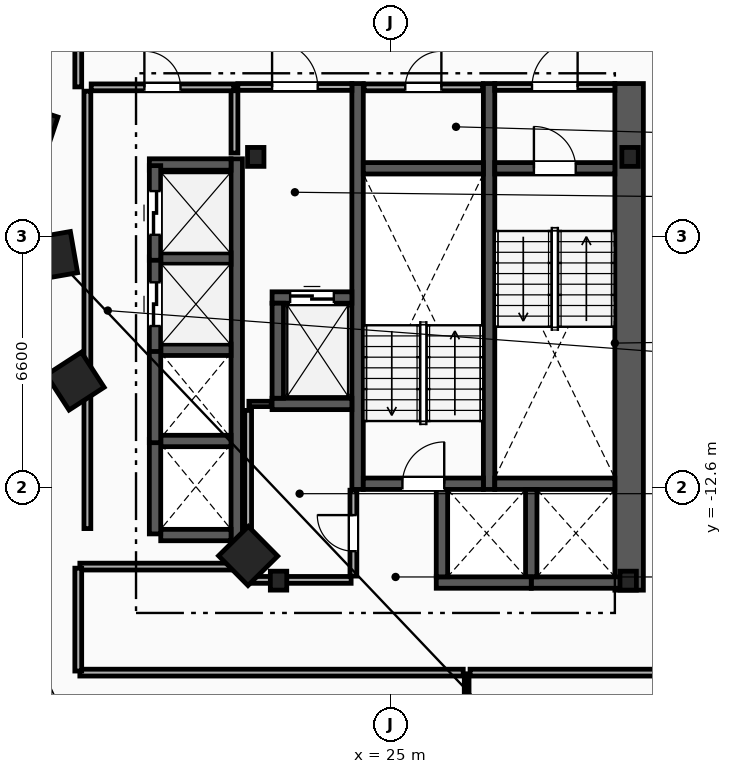
"""IFC4 building model, lengths in metres.
Left out: names, types, materials, properties, quantities, classifications, styles, units other than length and angle.
Written with IfcOpenShell. Run it as: python <this file> out.ifc"""

import sys

from ifc_helpers import new_model, si_unit, direction, frame, frame_2d, origin, origin_2d, place, context, subcontext, project, spatial, rectangle, i_section, extrude, element, fill, save


model = new_model("IFC4")
c1 = context("Model", 3, precision=1e-05, world=origin(), true_north=direction((0.0, 1.0)))
c2 = subcontext(c1, "Body", "Model", "MODEL_VIEW")
j1 = project(units=[si_unit("LENGTHUNIT", "METRE"), si_unit("PLANEANGLEUNIT", "RADIAN")], contexts=[c1])
p1 = place(None, origin())
s1 = spatial("IfcSite", under=j1, at=p1, CompositionType="ELEMENT")
p2 = place(p1, origin())
s2 = spatial("IfcBuilding", under=s1, at=p2, CompositionType="ELEMENT")
p3 = place(p2, frame((0.0, 0.0, 107.0)))
s3 = spatial("IfcBuildingStorey", under=s2, at=p3, CompositionType="ELEMENT", Elevation=107.0)
for number, where, z_axis, x_axis in (
    (1, (31.3, -3.9, 0.0), (0.0, 0.0, 1.0), (1.0, 0.0, 0.0)),
    (2, (21.45, -3.9, 0.0), (0.0, 0.0, 1.0), (1.0, 0.0, 0.0)),
    (3, (22.05, -15.05, 0.0), (0.0, 0.0, 1.0), (1.0, 0.0, 0.0)),
    (4, (31.25, -15.05, 0.0), (0.0, 0.0, 1.0), (1.0, 0.0, 0.0)),
):
    element("IfcColumn", number, at=place(p3, frame(where, z_axis=z_axis, x_axis=x_axis)), inside=s3, PredefinedType="COLUMN", context=c2, shape_type="SweptSolid", body=[
        extrude(i_section(OverallWidth=0.432, OverallDepth=0.498, WebThickness=0.056, FlangeThickness=0.089, FilletRadius=0.018, at=origin_2d()), origin(), (0.0, 0.0, 1.0), 3.6),
    ])
for number, where, z_axis, x_axis in (
    (5, (15.55, -3.2, 0.0), (0.0, 0.0, 1.0), (-0.315, -0.949, 0.0)),
    (6, (16.125, -6.5, 0.0), (0.0, 0.0, 1.0), (0.172, -0.985, 0.0)),
    (7, (16.7, -9.8, 0.0), (0.0, 0.0, 1.0), (0.544, -0.839, 0.0)),
    (8, (21.25, -14.4, 0.0), (0.0, 0.0, 1.0), (0.703, -0.711, 0.0)),
):
    element("IfcColumn", number, at=place(p3, frame(where, z_axis=z_axis, x_axis=x_axis)), inside=s3, PredefinedType="COLUMN", context=c2, shape_type="SweptSolid", body=[
        extrude(rectangle(XDim=1.1, YDim=1.1, at=origin_2d()), origin(), (0.0, 0.0, 1.0), 3.6),
    ])
p4 = place(p3, frame((31.275, -15.3, 0.0), z_axis=(0.0, 0.0, 1.0), x_axis=(0.0, 1.0, 0.0)))
e9 = element("IfcWall", 9, at=p4, inside=s3, PredefinedType="SHEAR", context=c2, shape_type="SweptSolid", body=[
    extrude(rectangle(XDim=13.33, YDim=0.75, at=frame_2d((6.665, 0.0))), origin(), (0.0, 0.0, 1.0), 3.3),
])
for number, where, z_axis, x_axis in (
    (10, (27.59, -12.65, 0.0), (0.0, 0.0, 1.0), (0.0, 1.0, 0.0)),
    (11, (24.13, -12.65, 0.0), (0.0, 0.0, 1.0), (0.0, 1.0, 0.0)),
):
    element("IfcWall", number, at=place(p3, frame(where, z_axis=z_axis, x_axis=x_axis)), inside=s3, PredefinedType="SHEAR", context=c2, shape_type="SweptSolid", body=[
        extrude(rectangle(XDim=10.68, YDim=0.3, at=frame_2d((5.34, 0.0))), origin(), (0.0, 0.0, 1.0), 3.3),
    ])
p5 = place(p3, frame((27.74, -4.2, 0.0), z_axis=(0.0, 0.0, 1.0), x_axis=(1.0, 0.0, 0.0)))
e12 = element("IfcWall", 12, at=p5, inside=s3, PredefinedType="SHEAR", context=c2, shape_type="SweptSolid", body=[
    extrude(rectangle(XDim=3.16, YDim=0.3, at=frame_2d((1.58, 0.0))), origin(), (0.0, 0.0, 1.0), 3.3),
])
p6 = place(p5, frame((1.03, 0.0, 0.0)))
e13 = element("IfcOpeningElement", 13, at=p6, cuts=e12, PredefinedType="OPENING", context=c2, shape_type="SweptSolid", body=[
    extrude(rectangle(XDim=1.1, YDim=2.15, at=frame_2d((0.55, 1.075))), frame((0.0, 0.16, 0.0), z_axis=(0.0, -1.0, 0.0), x_axis=(1.0, 0.0, 0.0)), (0.0, 0.0, 1.0), 0.32),
])
p7 = place(p3, frame((27.74, -12.5, 0.0), z_axis=(0.0, 0.0, 1.0), x_axis=(1.0, 0.0, 0.0)))
e14 = element("IfcWall", 14, at=p7, inside=s3, PredefinedType="SHEAR", context=c2, shape_type="SweptSolid", body=[
    extrude(rectangle(XDim=3.16, YDim=0.3, at=frame_2d((1.58, 0.0))), origin(), (0.0, 0.0, 1.0), 3.3),
])
p8 = place(p3, frame((24.28, -12.5, 0.0), z_axis=(0.0, 0.0, 1.0), x_axis=(1.0, 0.0, 0.0)))
e15 = element("IfcWall", 15, at=p8, inside=s3, PredefinedType="SHEAR", context=c2, shape_type="SweptSolid", body=[
    extrude(rectangle(XDim=3.16, YDim=0.3, at=frame_2d((1.58, 0.0))), origin(), (0.0, 0.0, 1.0), 3.3),
])
p9 = place(p8, frame((1.03, 0.0, 0.0)))
e16 = element("IfcOpeningElement", 16, at=p9, cuts=e15, PredefinedType="OPENING", context=c2, shape_type="SweptSolid", body=[
    extrude(rectangle(XDim=1.1, YDim=2.15, at=frame_2d((0.55, 1.075))), frame((0.0, 0.16, 0.0), z_axis=(0.0, -1.0, 0.0), x_axis=(1.0, 0.0, 0.0)), (0.0, 0.0, 1.0), 0.32),
])
p10 = place(p3, frame((24.28, -4.2, 0.0), z_axis=(0.0, 0.0, 1.0), x_axis=(1.0, 0.0, 0.0)))
e17 = element("IfcWall", 17, at=p10, inside=s3, PredefinedType="SHEAR", context=c2, shape_type="SweptSolid", body=[
    extrude(rectangle(XDim=3.16, YDim=0.3, at=frame_2d((1.58, 0.0))), origin(), (0.0, 0.0, 1.0), 3.3),
])
p11 = place(p3, frame((20.89, -3.8, 0.0), z_axis=(0.0, 0.0, 1.0), x_axis=(0.0, 1.0, 0.0)))
e18 = element("IfcWall", 18, at=p11, inside=s3, PredefinedType="PARTITIONING", context=c2, shape_type="SweptSolid", body=[
    extrude(rectangle(XDim=1.65, YDim=0.18, at=frame_2d((0.825, 0.0))), origin(), (0.0, 0.0, 1.0), 3.3),
])
p12 = place(p3, frame((20.98, -2.06, 0.0), z_axis=(0.0, 0.0, 1.0), x_axis=(1.0, 0.0, 0.0)))
e19 = element("IfcWall", 19, at=p12, inside=s3, PredefinedType="PARTITIONING", context=c2, shape_type="SweptSolid", body=[
    extrude(rectangle(XDim=3.0, YDim=0.18, at=frame_2d((1.5, 0.0))), origin(), (0.0, 0.0, 1.0), 3.3),
])
p13 = place(p12, frame((0.9, 0.0, 0.0)))
e20 = element("IfcOpeningElement", 20, at=p13, cuts=e19, PredefinedType="OPENING", context=c2, shape_type="SweptSolid", body=[
    extrude(rectangle(XDim=1.2, YDim=2.15, at=frame_2d((0.6, 1.075))), frame((0.0, 0.1, 0.0), z_axis=(0.0, -1.0, 0.0), x_axis=(1.0, 0.0, 0.0)), (0.0, 0.0, 1.0), 0.2),
])
p14 = place(p3, frame((27.74, -2.06, 0.0), z_axis=(0.0, 0.0, 1.0), x_axis=(1.0, 0.0, 0.0)))
e21 = element("IfcWall", 21, at=p14, inside=s3, PredefinedType="PARTITIONING", context=c2, shape_type="SweptSolid", body=[
    extrude(rectangle(XDim=3.16, YDim=0.18, at=frame_2d((1.58, 0.0))), origin(), (0.0, 0.0, 1.0), 3.3),
])
p15 = place(p14, frame((0.98, 0.0, 0.0)))
e22 = element("IfcOpeningElement", 22, at=p15, cuts=e21, PredefinedType="OPENING", context=c2, shape_type="SweptSolid", body=[
    extrude(rectangle(XDim=1.2, YDim=2.15, at=frame_2d((0.6, 1.075))), frame((0.0, 0.1, 0.0), z_axis=(0.0, -1.0, 0.0), x_axis=(1.0, 0.0, 0.0)), (0.0, 0.0, 1.0), 0.2),
])
p16 = place(p3, frame((21.88, -7.6, 0.0), z_axis=(0.0, 0.0, 1.0), x_axis=(1.0, 0.0, 0.0)))
e23 = element("IfcWall", 23, at=p16, inside=s3, PredefinedType="SHEAR", context=c2, shape_type="SweptSolid", body=[
    extrude(rectangle(XDim=2.1, YDim=0.3, at=frame_2d((1.05, 0.0))), origin(), (0.0, 0.0, 1.0), 3.3),
])
p17 = place(p16, frame((0.475, 0.0, 0.0)))
e24 = element("IfcOpeningElement", 24, at=p17, cuts=e23, PredefinedType="OPENING", context=c2, shape_type="SweptSolid", body=[
    extrude(rectangle(XDim=1.15, YDim=2.2, at=frame_2d((0.575, 1.1))), frame((0.0, 0.16, 0.0), z_axis=(0.0, -1.0, 0.0), x_axis=(1.0, 0.0, 0.0)), (0.0, 0.0, 1.0), 0.32),
])
p18 = place(p3, frame((21.88, -10.4, 0.0), z_axis=(0.0, 0.0, 1.0), x_axis=(1.0, 0.0, 0.0)))
e25 = element("IfcWall", 25, at=p18, inside=s3, PredefinedType="SHEAR", context=c2, shape_type="SweptSolid", body=[
    extrude(rectangle(XDim=2.1, YDim=0.3, at=frame_2d((1.05, 0.0))), origin(), (0.0, 0.0, 1.0), 3.3),
])
for number, where, z_axis, x_axis in (
    (26, (22.03, -10.25, 0.0), (0.0, 0.0, 1.0), (0.0, 1.0, 0.0)),
    (27, (28.7, -15.1, 0.0), (0.0, 0.0, 1.0), (1.0, 0.0, 0.0)),
):
    element("IfcWall", number, at=place(p3, frame(where, z_axis=z_axis, x_axis=x_axis)), inside=s3, PredefinedType="SHEAR", context=c2, shape_type="SweptSolid", body=[
        extrude(rectangle(XDim=2.5, YDim=0.3, at=frame_2d((1.25, 0.0))), origin(), (0.0, 0.0, 1.0), 3.3),
    ])
p19 = place(p3, frame((28.7, -14.95, 0.0), z_axis=(0.0, 0.0, 1.0), x_axis=(0.0, 1.0, 0.0)))
e28 = element("IfcWall", 28, at=p19, inside=s3, PredefinedType="SHEAR", context=c2, shape_type="SweptSolid", body=[
    extrude(rectangle(XDim=2.3, YDim=0.3, at=frame_2d((1.15, 0.0))), origin(), (0.0, 0.0, 1.0), 3.3),
])
p20 = place(p3, frame((26.2, -15.1, 0.0), z_axis=(0.0, 0.0, 1.0), x_axis=(1.0, 0.0, 0.0)))
e29 = element("IfcWall", 29, at=p20, inside=s3, PredefinedType="SHEAR", context=c2, shape_type="SweptSolid", body=[
    extrude(rectangle(XDim=2.5, YDim=0.3, at=frame_2d((1.25, 0.0))), origin(), (0.0, 0.0, 1.0), 3.3),
])
p21 = place(p3, frame((26.35, -14.95, 0.0), z_axis=(0.0, 0.0, 1.0), x_axis=(0.0, 1.0, 0.0)))
e30 = element("IfcWall", 30, at=p21, inside=s3, PredefinedType="SHEAR", context=c2, shape_type="SweptSolid", body=[
    extrude(rectangle(XDim=2.3, YDim=0.3, at=frame_2d((1.15, 0.0))), origin(), (0.0, 0.0, 1.0), 3.3),
])
p22 = place(p3, frame((20.95, -14.0, 0.0), z_axis=(0.0, 0.0, 1.0), x_axis=(0.0, 1.0, 0.0)))
e31 = element("IfcWall", 31, at=p22, inside=s3, PredefinedType="SHEAR", context=c2, shape_type="SweptSolid", body=[
    extrude(rectangle(XDim=10.05, YDim=0.3, at=frame_2d((5.025, 0.0))), origin(), (0.0, 0.0, 1.0), 3.3),
])
p23 = place(p3, frame((18.95, -13.85, 0.0), z_axis=(0.0, 0.0, 1.0), x_axis=(1.0, 0.0, 0.0)))
e32 = element("IfcWall", 32, at=p23, inside=s3, PredefinedType="SHEAR", context=c2, shape_type="SweptSolid", body=[
    extrude(rectangle(XDim=1.85, YDim=0.3, at=frame_2d((0.925, 0.0))), origin(), (0.0, 0.0, 1.0), 3.3),
])
p24 = place(p3, frame((18.65, -4.1, 0.0), z_axis=(0.0, 0.0, 1.0), x_axis=(1.0, 0.0, 0.0)))
e33 = element("IfcWall", 33, at=p24, inside=s3, PredefinedType="SHEAR", context=c2, shape_type="SweptSolid", body=[
    extrude(rectangle(XDim=2.15, YDim=0.3, at=frame_2d((1.075, 0.0))), origin(), (0.0, 0.0, 1.0), 3.3),
])
for number, where, z_axis, x_axis in (
    (34, (18.95, -11.375, 0.0), (0.0, 0.0, 1.0), (1.0, 0.0, 0.0)),
    (35, (18.95, -8.975, 0.0), (0.0, 0.0, 1.0), (1.0, 0.0, 0.0)),
    (36, (18.95, -6.575, 0.0), (0.0, 0.0, 1.0), (1.0, 0.0, 0.0)),
):
    element("IfcWall", number, at=place(p3, frame(where, z_axis=z_axis, x_axis=x_axis)), inside=s3, PredefinedType="SHEAR", context=c2, shape_type="SweptSolid", body=[
        extrude(rectangle(XDim=1.85, YDim=0.3, at=frame_2d((0.925, 0.0))), origin(), (0.0, 0.0, 1.0), 3.3),
    ])
for number, where, z_axis, x_axis in (
    (37, (18.8, -13.82, 0.0), (0.0, 0.0, 1.0), (0.0, 1.0, 0.0)),
    (38, (18.8, -11.42, 0.0), (0.0, 0.0, 1.0), (0.0, 1.0, 0.0)),
):
    element("IfcWall", number, at=place(p3, frame(where, z_axis=z_axis, x_axis=x_axis)), inside=s3, PredefinedType="SHEAR", context=c2, shape_type="SweptSolid", body=[
        extrude(rectangle(XDim=2.49, YDim=0.3, at=frame_2d((1.245, 0.0))), origin(), (0.0, 0.0, 1.0), 3.3),
    ])
p25 = place(p3, frame((18.8, -9.02, 0.0), z_axis=(0.0, 0.0, 1.0), x_axis=(0.0, 1.0, 0.0)))
e39 = element("IfcWall", 39, at=p25, inside=s3, PredefinedType="SHEAR", context=c2, shape_type="SweptSolid", body=[
    extrude(rectangle(XDim=2.49, YDim=0.3, at=frame_2d((1.245, 0.0))), origin(), (0.0, 0.0, 1.0), 3.3),
])
p26 = place(p25, frame((0.67, 0.0, 0.0)))
e40 = element("IfcOpeningElement", 40, at=p26, cuts=e39, PredefinedType="OPENING", context=c2, shape_type="SweptSolid", body=[
    extrude(rectangle(XDim=1.15, YDim=2.2, at=frame_2d((0.575, 1.1))), frame((0.0, 0.16, 0.0), z_axis=(0.0, -1.0, 0.0), x_axis=(1.0, 0.0, 0.0)), (0.0, 0.0, 1.0), 0.32),
])
p27 = place(p3, frame((18.8, -6.62, 0.0), z_axis=(0.0, 0.0, 1.0), x_axis=(0.0, 1.0, 0.0)))
e41 = element("IfcWall", 41, at=p27, inside=s3, PredefinedType="SHEAR", context=c2, shape_type="SweptSolid", body=[
    extrude(rectangle(XDim=2.49, YDim=0.3, at=frame_2d((1.245, 0.0))), origin(), (0.0, 0.0, 1.0), 3.3),
])
p28 = place(p27, frame((0.67, 0.0, 0.0)))
e42 = element("IfcOpeningElement", 42, at=p28, cuts=e41, PredefinedType="OPENING", context=c2, shape_type="SweptSolid", body=[
    extrude(rectangle(XDim=1.15, YDim=2.2, at=frame_2d((0.575, 1.1))), frame((0.0, 0.16, 0.0), z_axis=(0.0, -1.0, 0.0), x_axis=(1.0, 0.0, 0.0)), (0.0, 0.0, 1.0), 0.32),
])
p29 = place(p3, frame((17.02, -13.68, 0.0), z_axis=(0.0, 0.0, 1.0), x_axis=(0.0, 1.0, 0.0)))
e43 = element("IfcWall", 43, at=p29, inside=s3, PredefinedType="PARTITIONING", context=c2, shape_type="SweptSolid", body=[
    extrude(rectangle(XDim=11.51, YDim=0.18, at=frame_2d((5.755, 0.0))), origin(), (0.0, 0.0, 1.0), 3.3),
])
p30 = place(p3, frame((17.12, -2.07, 0.0), z_axis=(0.0, 0.0, 1.0), x_axis=(1.0, 0.0, 0.0)))
e44 = element("IfcWall", 44, at=p30, inside=s3, PredefinedType="PARTITIONING", context=c2, shape_type="SweptSolid", body=[
    extrude(rectangle(XDim=3.75, YDim=0.18, at=frame_2d((1.875, 0.0))), origin(), (0.0, 0.0, 1.0), 3.3),
])
p31 = place(p30, frame((1.4, 0.0, 0.0)))
e45 = element("IfcOpeningElement", 45, at=p31, cuts=e44, PredefinedType="OPENING", context=c2, shape_type="SweptSolid", body=[
    extrude(rectangle(XDim=0.95, YDim=2.1, at=frame_2d((0.475, 1.05))), frame((0.0, 0.1, 0.0), z_axis=(0.0, -1.0, 0.0), x_axis=(1.0, 0.0, 0.0)), (0.0, 0.0, 1.0), 0.2),
])
p32 = place(p3, frame((21.27, -10.4, 0.0), z_axis=(0.0, 0.0, 1.0), x_axis=(1.0, 0.0, 0.0)))
e46 = element("IfcWall", 46, at=p32, inside=s3, PredefinedType="PARTITIONING", context=c2, shape_type="SweptSolid", body=[
    extrude(rectangle(XDim=0.59, YDim=0.14, at=frame_2d((0.295, 0.0))), origin(), (0.0, 0.0, 1.0), 3.3),
])
p33 = place(p3, frame((21.25, -14.93, 0.0), z_axis=(0.0, 0.0, 1.0), x_axis=(0.0, 1.0, 0.0)))
e47 = element("IfcWall", 47, at=p33, inside=s3, PredefinedType="PARTITIONING", context=c2, shape_type="SweptSolid", body=[
    extrude(rectangle(XDim=4.36, YDim=0.18, at=frame_2d((2.18, 0.0))), origin(), (0.0, 0.0, 1.0), 3.3),
])
p34 = place(p3, frame((21.35, -15.03, 0.0), z_axis=(0.0, 0.0, 1.0), x_axis=(1.0, 0.0, 0.0)))
e48 = element("IfcWall", 48, at=p34, inside=s3, PredefinedType="PARTITIONING", context=c2, shape_type="SweptSolid", body=[
    extrude(rectangle(XDim=2.61, YDim=0.18, at=frame_2d((1.305, 0.0))), origin(), (0.0, 0.0, 1.0), 2.373),
])
p35 = place(p3, frame((24.3, -2.07, 0.0), z_axis=(0.0, 0.0, 1.0), x_axis=(1.0, 0.0, 0.0)))
e49 = element("IfcWall", 49, at=p35, inside=s3, PredefinedType="PARTITIONING", context=c2, shape_type="SweptSolid", body=[
    extrude(rectangle(XDim=3.12, YDim=0.18, at=frame_2d((1.56, 0.0))), origin(), (0.0, 0.0, 1.0), 3.3),
])
p36 = place(p35, frame((1.085, 0.0, 0.0)))
e50 = element("IfcOpeningElement", 50, at=p36, cuts=e49, PredefinedType="OPENING", context=c2, shape_type="SweptSolid", body=[
    extrude(rectangle(XDim=0.95, YDim=2.1, at=frame_2d((0.475, 1.05))), frame((0.0, 0.1, 0.0), z_axis=(0.0, -1.0, 0.0), x_axis=(1.0, 0.0, 0.0)), (0.0, 0.0, 1.0), 0.2),
])
p37 = place(p3, frame((24.02, -14.93, 0.0), z_axis=(0.0, 0.0, 1.0), x_axis=(0.0, 1.0, 0.0)))
e51 = element("IfcWall", 51, at=p37, inside=s3, PredefinedType="PARTITIONING", context=c2, shape_type="SweptSolid", body=[
    extrude(rectangle(XDim=2.26, YDim=0.18, at=frame_2d((1.13, 0.0))), origin(), (0.0, 0.0, 1.0), 3.3),
])
p38 = place(p37, frame((0.655, 0.0, 0.0)))
e52 = element("IfcOpeningElement", 52, at=p38, cuts=e51, PredefinedType="OPENING", context=c2, shape_type="SweptSolid", body=[
    extrude(rectangle(XDim=0.95, YDim=2.1, at=frame_2d((0.475, 1.05))), frame((0.0, 0.1, 0.0), z_axis=(0.0, -1.0, 0.0), x_axis=(1.0, 0.0, 0.0)), (0.0, 0.0, 1.0), 0.2),
])
p39 = place(p3, frame((27.0, -25.404, 0.0), z_axis=(0.0, 0.0, 1.0), x_axis=(0.0, 1.0, 0.0)))
e53 = element("IfcWall", 53, at=p39, inside=s3, PredefinedType="PARTITIONING", context=c2, shape_type="SweptSolid", body=[
    extrude(rectangle(XDim=7.904, YDim=0.125, at=frame_2d((3.952, 0.0))), origin(), (0.0, 0.0, 1.0), 3.3),
])
p40 = place(p3, frame((27.09, -17.47, 0.0), z_axis=(0.0, 0.0, 1.0), x_axis=(1.0, 0.0, 0.0)))
e54 = element("IfcWall", 54, at=p40, inside=s3, PredefinedType="PARTITIONING", context=c2, shape_type="SweptSolid", body=[
    extrude(rectangle(XDim=6.538, YDim=0.18, at=frame_2d((3.269, 0.0))), origin(), (0.0, 0.0, 1.0), 3.3),
])
p41 = place(p3, frame((16.822, -17.47, 0.0), z_axis=(0.0, 0.0, 1.0), x_axis=(1.0, 0.0, 0.0)))
e55 = element("IfcWall", 55, at=p41, inside=s3, PredefinedType="PARTITIONING", context=c2, shape_type="SweptSolid", body=[
    extrude(rectangle(XDim=10.088, YDim=0.18, at=frame_2d((5.044, 0.0))), origin(), (0.0, 0.0, 1.0), 3.3),
])
p42 = place(p3, frame((21.178, -14.68, 0.0), z_axis=(0.0, 0.0, 1.0), x_axis=(-1.0, 0.0, 0.0)))
e56 = element("IfcWall", 56, at=p42, inside=s3, PredefinedType="PARTITIONING", context=c2, shape_type="SweptSolid", body=[
    extrude(rectangle(XDim=4.357, YDim=0.18, at=frame_2d((2.178, 0.0))), origin(), (0.0, 0.0, 1.0), 3.3),
])
p43 = place(p3, frame((16.78, -14.721, 0.0), z_axis=(0.0, 0.0, 1.0), x_axis=(0.0, -1.0, 0.0)))
e57 = element("IfcWall", 57, at=p43, inside=s3, PredefinedType="PARTITIONING", context=c2, shape_type="SweptSolid", body=[
    extrude(rectangle(XDim=2.707, YDim=0.18, at=frame_2d((1.354, 0.0))), origin(), (0.0, 0.0, 1.0), 3.3),
])
p44 = place(p3, frame((16.78, 0.329, 0.0), z_axis=(0.0, 0.0, 1.0), x_axis=(0.0, -1.0, 0.0)))
e58 = element("IfcWall", 58, at=p44, inside=s3, PredefinedType="PARTITIONING", context=c2, shape_type="SweptSolid", body=[
    extrude(rectangle(XDim=2.387, YDim=0.18, at=frame_2d((1.194, 0.0))), origin(), (0.0, 0.0, 1.0), 3.3),
])
p45 = place(p6, origin())
e59 = element("IfcDoor", 59, at=p45, inside=s3, OperationType="SINGLE_SWING_LEFT", PredefinedType="DOOR", context=c2, shape_type="SweptSolid", body=[
    extrude(rectangle(XDim=1.1, YDim=2.15, at=frame_2d((0.55, 1.075))), frame((0.0, 0.025, 0.0), z_axis=(0.0, -1.0, 0.0), x_axis=(1.0, 0.0, 0.0)), (0.0, 0.0, 1.0), 0.05),
])
fill(e13, e59)
p46 = place(p9, origin())
e60 = element("IfcDoor", 60, at=p46, inside=s3, OperationType="SINGLE_SWING_RIGHT", PredefinedType="DOOR", context=c2, shape_type="SweptSolid", body=[
    extrude(rectangle(XDim=1.1, YDim=2.15, at=frame_2d((0.55, 1.075))), frame((0.0, 0.025, 0.0), z_axis=(0.0, -1.0, 0.0), x_axis=(1.0, 0.0, 0.0)), (0.0, 0.0, 1.0), 0.05),
])
fill(e16, e60)
p47 = place(p13, origin())
e61 = element("IfcDoor", 61, at=p47, inside=s3, OperationType="SINGLE_SWING_LEFT", PredefinedType="DOOR", context=c2, shape_type="SweptSolid", body=[
    extrude(rectangle(XDim=1.2, YDim=2.15, at=frame_2d((0.6, 1.075))), frame((0.0, 0.025, 0.0), z_axis=(0.0, -1.0, 0.0), x_axis=(1.0, 0.0, 0.0)), (0.0, 0.0, 1.0), 0.05),
])
fill(e20, e61)
p48 = place(p15, origin())
e62 = element("IfcDoor", 62, at=p48, inside=s3, OperationType="SINGLE_SWING_RIGHT", PredefinedType="DOOR", context=c2, shape_type="SweptSolid", body=[
    extrude(rectangle(XDim=1.2, YDim=2.15, at=frame_2d((0.6, 1.075))), frame((0.0, 0.025, 0.0), z_axis=(0.0, -1.0, 0.0), x_axis=(1.0, 0.0, 0.0)), (0.0, 0.0, 1.0), 0.05),
])
fill(e22, e62)
p49 = place(p17, origin())
e63 = element("IfcDoor", 63, at=p49, inside=s3, OperationType="SLIDING_TO_LEFT", PredefinedType="TRAPDOOR", context=c2, shape_type="SweptSolid", body=[
    extrude(rectangle(XDim=1.15, YDim=2.2, at=frame_2d((0.575, 1.1))), frame((0.0, 0.025, 0.0), z_axis=(0.0, -1.0, 0.0), x_axis=(1.0, 0.0, 0.0)), (0.0, 0.0, 1.0), 0.05),
])
fill(e24, e63)
p50 = place(p26, origin())
e64 = element("IfcDoor", 64, at=p50, inside=s3, OperationType="SLIDING_TO_LEFT", PredefinedType="TRAPDOOR", context=c2, shape_type="SweptSolid", body=[
    extrude(rectangle(XDim=1.15, YDim=2.2, at=frame_2d((0.575, 1.1))), frame((0.0, 0.025, 0.0), z_axis=(0.0, -1.0, 0.0), x_axis=(1.0, 0.0, 0.0)), (0.0, 0.0, 1.0), 0.05),
])
fill(e40, e64)
p51 = place(p28, origin())
e65 = element("IfcDoor", 65, at=p51, inside=s3, OperationType="SLIDING_TO_LEFT", PredefinedType="TRAPDOOR", context=c2, shape_type="SweptSolid", body=[
    extrude(rectangle(XDim=1.15, YDim=2.2, at=frame_2d((0.575, 1.1))), frame((0.0, 0.025, 0.0), z_axis=(0.0, -1.0, 0.0), x_axis=(1.0, 0.0, 0.0)), (0.0, 0.0, 1.0), 0.05),
])
fill(e42, e65)
p52 = place(p31, origin())
e66 = element("IfcDoor", 66, at=p52, inside=s3, OperationType="SINGLE_SWING_LEFT", PredefinedType="DOOR", context=c2, shape_type="SweptSolid", body=[
    extrude(rectangle(XDim=0.95, YDim=2.1, at=frame_2d((0.475, 1.05))), frame((0.0, 0.025, 0.0), z_axis=(0.0, -1.0, 0.0), x_axis=(1.0, 0.0, 0.0)), (0.0, 0.0, 1.0), 0.05),
])
fill(e45, e66)
p53 = place(p36, origin())
e67 = element("IfcDoor", 67, at=p53, inside=s3, OperationType="SINGLE_SWING_RIGHT", PredefinedType="DOOR", context=c2, shape_type="SweptSolid", body=[
    extrude(rectangle(XDim=0.95, YDim=2.1, at=frame_2d((0.475, 1.05))), frame((0.0, 0.025, 0.0), z_axis=(0.0, -1.0, 0.0), x_axis=(1.0, 0.0, 0.0)), (0.0, 0.0, 1.0), 0.05),
])
fill(e50, e67)
p54 = place(p38, origin())
e68 = element("IfcDoor", 68, at=p54, inside=s3, OperationType="SINGLE_SWING_RIGHT", PredefinedType="DOOR", context=c2, shape_type="SweptSolid", body=[
    extrude(rectangle(XDim=0.95, YDim=2.1, at=frame_2d((0.475, 1.05))), frame((0.0, 0.025, 0.0), z_axis=(0.0, -1.0, 0.0), x_axis=(1.0, 0.0, 0.0)), (0.0, 0.0, 1.0), 0.05),
])
fill(e52, e68)
save(model, sys.argv[1])
